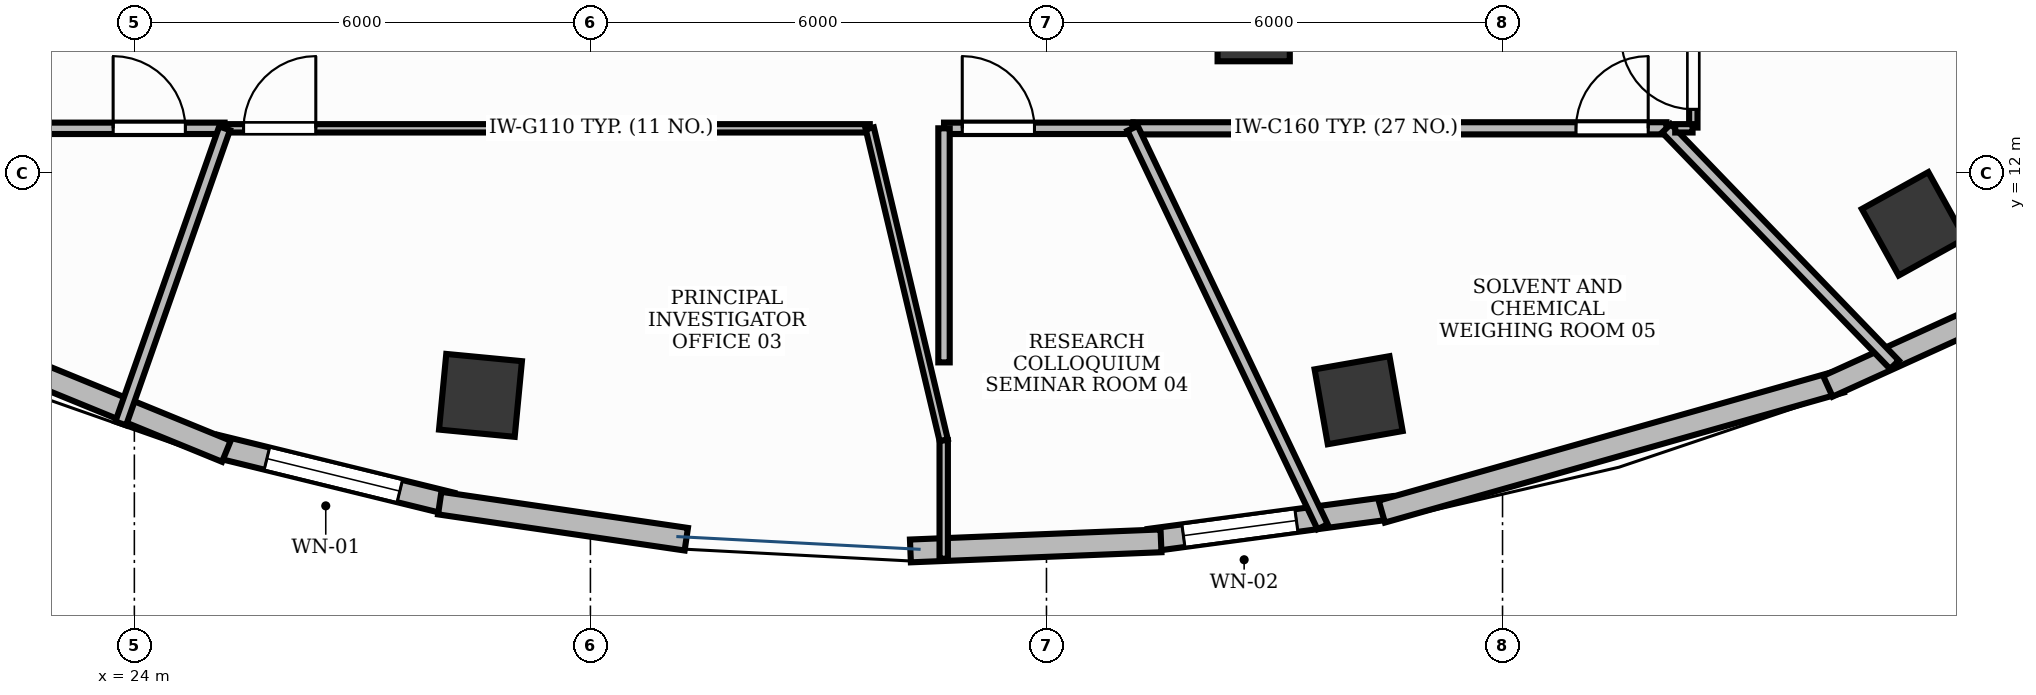
"""IFC4 building model, lengths in metres.
Left out: names, types, materials, properties, quantities, classifications, styles, units other than length and angle.
Written with IfcOpenShell. Run it as: python <this file> out.ifc"""

import sys

from ifc_helpers import new_model, si_unit, direction, frame, frame_2d, origin, origin_2d, place, context, subcontext, project, spatial, rectangle, extrude, element, fill, save


model = new_model("IFC4")
c1 = context("Model", 3, precision=1e-05, world=origin(), true_north=direction((0.0, 1.0)))
c2 = subcontext(c1, "Body", "Model", "MODEL_VIEW")
j1 = project(units=[si_unit("LENGTHUNIT", "METRE"), si_unit("PLANEANGLEUNIT", "RADIAN")], contexts=[c1])
p1 = place(None, origin())
s1 = spatial("IfcSite", under=j1, at=p1, CompositionType="ELEMENT")
p2 = place(p1, origin())
s2 = spatial("IfcBuilding", under=s1, at=p2, CompositionType="ELEMENT")
p3 = place(p2, frame((0.0, 0.0, 204.6)))
s3 = spatial("IfcBuildingStorey", under=s2, at=p3, CompositionType="ELEMENT", Elevation=204.6)
for number, where, z_axis, x_axis in (
    (1, (28.554, 9.076, -0.0), (0.0, 0.0, 1.0), (-0.995, 0.095, 0.0)),
    (2, (40.107, 9.013, -0.0), (0.0, 0.0, 1.0), (0.985, 0.173, 0.0)),
):
    element("IfcColumn", number, at=place(p3, frame(where, z_axis=z_axis, x_axis=x_axis)), inside=s3, PredefinedType="COLUMN", context=c2, shape_type="SweptSolid", body=[
        extrude(rectangle(XDim=1.0, YDim=1.0, at=origin_2d()), origin(), (0.0, 0.0, 1.0), 3.901),
    ])
p4 = place(p3, frame((38.726, 13.947, -0.0), z_axis=(0.0, 0.0, 1.0), x_axis=(1.0, 0.0, 0.0)))
e3 = element("IfcColumn", 3, at=p4, inside=s3, PredefinedType="COLUMN", context=c2, shape_type="SweptSolid", body=[
    extrude(rectangle(XDim=0.95, YDim=0.95, at=origin_2d()), origin(), (0.0, 0.0, 1.0), 3.901),
])
p5 = place(p3, frame((47.407, 11.334, -0.0), z_axis=(0.0, 0.0, 1.0), x_axis=(0.874535078577, 0.484962262797, 0.0)))
e4 = element("IfcColumn", 4, at=p5, inside=s3, PredefinedType="COLUMN", context=c2, shape_type="SweptSolid", body=[
    extrude(rectangle(XDim=1.0, YDim=1.0, at=origin_2d()), origin(), (0.0, 0.0, 1.0), 3.901),
])
p6 = place(p3, frame((25.063, 8.412, 0.0), z_axis=(0.0, 0.0, 1.0), x_axis=(0.971262421812, -0.238011150948, 0.0)))
e5 = element("IfcWall", 5, at=p6, inside=s3, PredefinedType="STANDARD", context=c2, shape_type="SweptSolid", body=[
    extrude(rectangle(XDim=3.201, YDim=0.3, at=frame_2d((1.601, 0.0))), origin(), (0.0, 0.0, 1.0), 3.9),
])
p7 = place(p6, frame((0.701, 0.0, 0.9)))
e6 = element("IfcOpeningElement", 6, at=p7, cuts=e5, PredefinedType="OPENING", context=c2, shape_type="SweptSolid", body=[
    extrude(rectangle(XDim=1.8, YDim=2.1, at=frame_2d((0.9, 1.05))), frame((0.0, 0.165, 0.0), z_axis=(0.0, -1.0, 0.0), x_axis=(1.0, 0.0, 0.0)), (0.0, 0.0, 1.0), 0.33),
])
p8 = place(p3, frame((37.352, 7.17, 0.0), z_axis=(0.0, 0.0, 1.0), x_axis=(0.991126983618, 0.132918404839, 0.0)))
e7 = element("IfcWall", 7, at=p8, inside=s3, PredefinedType="STANDARD", context=c2, shape_type="SweptSolid", body=[
    extrude(rectangle(XDim=3.242, YDim=0.3, at=frame_2d((1.621, 0.0))), origin(), (0.0, 0.0, 1.0), 3.9),
])
p9 = place(p8, frame((0.454, 0.0, 0.95)))
e8 = element("IfcOpeningElement", 8, at=p9, cuts=e7, PredefinedType="OPENING", context=c2, shape_type="SweptSolid", body=[
    extrude(rectangle(XDim=1.5, YDim=1.8, at=frame_2d((0.75, 0.9))), frame((0.0, 0.165, 0.0), z_axis=(0.0, -1.0, 0.0), x_axis=(1.0, 0.0, 0.0)), (0.0, 0.0, 1.0), 0.33),
])
p10 = place(p3, frame((19.526, 10.667, 0.0), z_axis=(0.0, 0.0, 1.0), x_axis=(0.925564684887, -0.37858950605, 0.0)))
e9 = element("IfcWall", 9, at=p10, inside=s3, PredefinedType="STANDARD", context=c2, shape_type="SweptSolid", body=[
    extrude(rectangle(XDim=6.142, YDim=0.3, at=frame_2d((3.071, 0.0))), origin(), (0.0, 0.0, 1.0), 3.47),
])
p11 = place(p3, frame((28.017, 7.659, 0.0), z_axis=(0.0, 0.0, 1.0), x_axis=(0.989444403328, -0.144912983283, 0.0)))
e10 = element("IfcWall", 10, at=p11, inside=s3, PredefinedType="STANDARD", context=c2, shape_type="SweptSolid", body=[
    extrude(rectangle(XDim=3.279, YDim=0.3, at=frame_2d((1.639, 0.0))), origin(), (0.0, 0.0, 1.0), 3.47),
])
p12 = place(p3, frame((34.21, 7.03, 0.0), z_axis=(0.0, 0.0, 1.0), x_axis=(0.999186472466, 0.040328566059, 0.0)))
e11 = element("IfcWall", 11, at=p12, inside=s3, PredefinedType="STANDARD", context=c2, shape_type="SweptSolid", body=[
    extrude(rectangle(XDim=3.299, YDim=0.3, at=frame_2d((1.65, 0.0))), origin(), (0.0, 0.0, 1.0), 3.9),
])
p13 = place(p3, frame((40.412, 7.548, 0.0), z_axis=(0.0, 0.0, 1.0), x_axis=(0.962117712706, 0.272634383189, 0.0)))
e12 = element("IfcWall", 12, at=p13, inside=s3, PredefinedType="STANDARD", context=c2, shape_type="SweptSolid", body=[
    extrude(rectangle(XDim=6.276, YDim=0.3, at=frame_2d((3.138, 0.0))), origin(), (0.0, 0.0, 1.0), 3.9),
])
p14 = place(p3, frame((46.28, 9.197, 0.0), z_axis=(0.0, 0.0, 1.0), x_axis=(0.910521310028, 0.413462143351, 0.0)))
e13 = element("IfcWall", 13, at=p14, inside=s3, PredefinedType="STANDARD", context=c2, shape_type="SweptSolid", body=[
    extrude(rectangle(XDim=3.131, YDim=0.3, at=frame_2d((1.565, 0.0))), origin(), (0.0, 0.0, 1.0), 3.9),
])
p15 = place(p3, frame((20.801, 12.59, 0.0), z_axis=(0.0, 0.0, 1.0), x_axis=(1.0, 0.0, 0.0)))
e14 = element("IfcWall", 14, at=p15, inside=s3, PredefinedType="PARTITIONING", context=c2, shape_type="SweptSolid", body=[
    extrude(rectangle(XDim=4.386, YDim=0.15, at=frame_2d((2.193, 0.0))), origin(), (0.0, 0.0, 1.0), 2.91),
])
p16 = place(p15, frame((2.92, 0.0, 0.0)))
e15 = element("IfcOpeningElement", 15, at=p16, cuts=e14, PredefinedType="OPENING", context=c2, shape_type="SweptSolid", body=[
    extrude(rectangle(XDim=0.95, YDim=2.15, at=frame_2d((0.475, 1.075))), frame((0.0, 0.09, 0.0), z_axis=(0.0, -1.0, 0.0), x_axis=(1.0, 0.0, 0.0)), (0.0, 0.0, 1.0), 0.18),
])
p17 = place(p3, frame((25.197, 12.59, 0.0), z_axis=(0.0, 0.0, 1.0), x_axis=(1.0, 0.0, 0.0)))
e16 = element("IfcWall", 16, at=p17, inside=s3, PredefinedType="MOVABLE", context=c2, shape_type="SweptSolid", body=[
    extrude(rectangle(XDim=8.478, YDim=0.11, at=frame_2d((4.239, 0.0))), origin(), (0.0, 0.0, 1.0), 2.91),
])
p18 = place(p17, frame((0.24, 0.0, 0.0)))
e17 = element("IfcOpeningElement", 17, at=p18, cuts=e16, PredefinedType="OPENING", context=c2, shape_type="SweptSolid", body=[
    extrude(rectangle(XDim=0.95, YDim=2.15, at=frame_2d((0.475, 1.075))), frame((0.0, 0.07, 0.0), z_axis=(0.0, -1.0, 0.0), x_axis=(1.0, 0.0, 0.0)), (0.0, 0.0, 1.0), 0.14),
])
p19 = place(p3, frame((34.652, 12.59, 0.0), z_axis=(0.0, 0.0, 1.0), x_axis=(1.0, 0.0, 0.0)))
e18 = element("IfcWall", 18, at=p19, inside=s3, PredefinedType="PARTITIONING", context=c2, shape_type="SweptSolid", body=[
    extrude(rectangle(XDim=2.48, YDim=0.15, at=frame_2d((1.24, 0.0))), origin(), (0.0, 0.0, 1.0), 2.91),
])
p20 = place(p19, frame((0.24, 0.0, 0.0)))
e19 = element("IfcOpeningElement", 19, at=p20, cuts=e18, PredefinedType="OPENING", context=c2, shape_type="SweptSolid", body=[
    extrude(rectangle(XDim=0.95, YDim=2.15, at=frame_2d((0.475, 1.075))), frame((0.0, 0.09, 0.0), z_axis=(0.0, -1.0, 0.0), x_axis=(1.0, 0.0, 0.0)), (0.0, 0.0, 1.0), 0.18),
])
p21 = place(p3, frame((37.143, 12.59, 0.0), z_axis=(0.0, 0.0, 1.0), x_axis=(1.0, 0.0, 0.0)))
e20 = element("IfcWall", 20, at=p21, inside=s3, PredefinedType="PARTITIONING", context=c2, shape_type="SweptSolid", body=[
    extrude(rectangle(XDim=7.013, YDim=0.16, at=frame_2d((3.507, 0.0))), origin(), (0.0, 0.0, 1.0), 2.91),
])
p22 = place(p21, frame((5.823, 0.0, 0.0)))
e21 = element("IfcOpeningElement", 21, at=p22, cuts=e20, PredefinedType="OPENING", context=c2, shape_type="SweptSolid", body=[
    extrude(rectangle(XDim=0.95, YDim=2.15, at=frame_2d((0.475, 1.075))), frame((0.0, 0.095, 0.0), z_axis=(0.0, -1.0, 0.0), x_axis=(1.0, 0.0, 0.0)), (0.0, 0.0, 1.0), 0.19),
])
p23 = place(p3, frame((44.51, 12.6, 0.0), z_axis=(0.0, 0.0, 1.0), x_axis=(0.0, 1.0, 0.0)))
e22 = element("IfcWall", 22, at=p23, inside=s3, PredefinedType="MOVABLE", context=c2, shape_type="SweptSolid", body=[
    extrude(rectangle(XDim=3.8, YDim=0.11, at=frame_2d((1.9, 0.0))), origin(), (0.0, 0.0, 1.0), 2.91),
])
p24 = place(p23, frame((0.24, 0.0, 0.0)))
e23 = element("IfcOpeningElement", 23, at=p24, cuts=e22, PredefinedType="OPENING", context=c2, shape_type="SweptSolid", body=[
    extrude(rectangle(XDim=0.95, YDim=2.15, at=frame_2d((0.475, 1.075))), frame((0.0, 0.07, 0.0), z_axis=(0.0, -1.0, 0.0), x_axis=(1.0, 0.0, 0.0)), (0.0, 0.0, 1.0), 0.14),
])
p25 = place(p3, frame((25.187, 12.59, 0.0), z_axis=(0.0, 0.0, 1.0), x_axis=(-0.33203815737, -0.9432659551, 0.0)))
e24 = element("IfcWall", 24, at=p25, inside=s3, PredefinedType="PARTITIONING", context=c2, shape_type="SweptSolid", body=[
    extrude(rectangle(XDim=4.116, YDim=0.15, at=frame_2d((2.058, 0.0))), origin(), (0.0, 0.0, 1.0), 2.91),
])
p26 = place(p3, frame((34.648, 8.487, 0.0), z_axis=(0.0, 0.0, 1.0), x_axis=(0.0, -1.0, 0.0)))
e25 = element("IfcWall", 25, at=p26, inside=s3, PredefinedType="MOVABLE", context=c2, shape_type="SweptSolid", body=[
    extrude(rectangle(XDim=1.559, YDim=0.11, at=frame_2d((0.779, 0.0))), origin(), (0.0, 0.0, 1.0), 2.91),
])
p27 = place(p3, frame((33.675, 12.59, 0.0), z_axis=(0.0, 0.0, 1.0), x_axis=(0.230652477901, -0.973036193797, 0.0)))
e26 = element("IfcWall", 26, at=p27, inside=s3, PredefinedType="MOVABLE", context=c2, shape_type="SweptSolid", body=[
    extrude(rectangle(XDim=4.217, YDim=0.11, at=frame_2d((2.108, 0.0))), origin(), (0.0, 0.0, 1.0), 2.91),
])
p28 = place(p3, frame((34.652, 9.51, 0.0), z_axis=(0.0, 0.0, 1.0), x_axis=(0.0, 1.0, 0.0)))
e27 = element("IfcWall", 27, at=p28, inside=s3, PredefinedType="PARTITIONING", context=c2, shape_type="SweptSolid", body=[
    extrude(rectangle(XDim=3.08, YDim=0.15, at=frame_2d((1.54, 0.0))), origin(), (0.0, 0.0, 1.0), 2.91),
])
p29 = place(p3, frame((37.132, 12.59, 0.0), z_axis=(0.0, 0.0, 1.0), x_axis=(0.430506245384, -0.902587598344, 0.0)))
e28 = element("IfcWall", 28, at=p29, inside=s3, PredefinedType="PARTITIONING", context=c2, shape_type="SweptSolid", body=[
    extrude(rectangle(XDim=5.808, YDim=0.15, at=frame_2d((2.904, 0.0))), origin(), (0.0, 0.0, 1.0), 2.91),
])
p30 = place(p3, frame((44.156, 12.59, 0.0), z_axis=(0.0, 0.0, 1.0), x_axis=(0.694194120351, -0.719787832121, 0.0)))
e29 = element("IfcWall", 29, at=p30, inside=s3, PredefinedType="PARTITIONING", context=c2, shape_type="SweptSolid", body=[
    extrude(rectangle(XDim=4.321, YDim=0.16, at=frame_2d((2.161, 0.0))), origin(), (0.0, 0.0, 1.0), 2.91),
])
p31 = place(p3, frame((44.272, 12.59, 0.0), z_axis=(0.0, 0.0, 1.0), x_axis=(1.0, 0.0, 0.0)))
e30 = element("IfcWall", 30, at=p31, inside=s3, PredefinedType="MOVABLE", context=c2, shape_type="SweptSolid", body=[
    extrude(rectangle(XDim=0.228, YDim=0.11, at=frame_2d((0.114, 0.0))), origin(), (0.0, 0.0, 1.0), 2.91),
])
p32 = place(p7, origin())
e31 = element("IfcWindow", 31, at=p32, inside=s3, PartitioningType="SINGLE_PANEL", PredefinedType="WINDOW", context=c2, shape_type="SweptSolid", body=[
    extrude(rectangle(XDim=1.8, YDim=2.1, at=frame_2d((0.9, 1.05))), frame((0.0, 0.03, 0.0), z_axis=(0.0, -1.0, 0.0), x_axis=(1.0, 0.0, 0.0)), (0.0, 0.0, 1.0), 0.06),
])
fill(e6, e31)
p33 = place(p9, origin())
e32 = element("IfcWindow", 32, at=p33, inside=s3, PartitioningType="DOUBLE_PANEL_VERTICAL", PredefinedType="WINDOW", context=c2, shape_type="SweptSolid", body=[
    extrude(rectangle(XDim=1.5, YDim=1.8, at=frame_2d((0.75, 0.9))), frame((0.0, 0.03, 0.0), z_axis=(0.0, -1.0, 0.0), x_axis=(1.0, 0.0, 0.0)), (0.0, 0.0, 1.0), 0.06),
])
fill(e8, e32)
p34 = place(p16, origin())
e33 = element("IfcDoor", 33, at=p34, inside=s3, OperationType="SINGLE_SWING_LEFT", PredefinedType="DOOR", context=c2, shape_type="SweptSolid", body=[
    extrude(rectangle(XDim=0.95, YDim=2.15, at=frame_2d((0.475, 1.075))), frame((0.0, 0.025, 0.0), z_axis=(0.0, -1.0, 0.0), x_axis=(1.0, 0.0, 0.0)), (0.0, 0.0, 1.0), 0.05),
])
fill(e15, e33)
p35 = place(p18, origin())
e34 = element("IfcDoor", 34, at=p35, inside=s3, OperationType="SINGLE_SWING_RIGHT", PredefinedType="DOOR", context=c2, shape_type="SweptSolid", body=[
    extrude(rectangle(XDim=0.95, YDim=2.15, at=frame_2d((0.475, 1.075))), frame((0.0, 0.025, 0.0), z_axis=(0.0, -1.0, 0.0), x_axis=(1.0, 0.0, 0.0)), (0.0, 0.0, 1.0), 0.05),
])
fill(e17, e34)
p36 = place(p20, origin())
e35 = element("IfcDoor", 35, at=p36, inside=s3, OperationType="SINGLE_SWING_LEFT", PredefinedType="DOOR", context=c2, shape_type="SweptSolid", body=[
    extrude(rectangle(XDim=0.95, YDim=2.15, at=frame_2d((0.475, 1.075))), frame((0.0, 0.025, 0.0), z_axis=(0.0, -1.0, 0.0), x_axis=(1.0, 0.0, 0.0)), (0.0, 0.0, 1.0), 0.05),
])
fill(e19, e35)
p37 = place(p22, origin())
e36 = element("IfcDoor", 36, at=p37, inside=s3, OperationType="SINGLE_SWING_RIGHT", PredefinedType="DOOR", context=c2, shape_type="SweptSolid", body=[
    extrude(rectangle(XDim=0.95, YDim=2.15, at=frame_2d((0.475, 1.075))), frame((0.0, 0.025, 0.0), z_axis=(0.0, -1.0, 0.0), x_axis=(1.0, 0.0, 0.0)), (0.0, 0.0, 1.0), 0.05),
])
fill(e21, e36)
p38 = place(p24, origin())
e37 = element("IfcDoor", 37, at=p38, inside=s3, OperationType="SINGLE_SWING_RIGHT", PredefinedType="DOOR", context=c2, shape_type="SweptSolid", body=[
    extrude(rectangle(XDim=0.95, YDim=2.15, at=frame_2d((0.475, 1.075))), frame((0.0, 0.025, 0.0), z_axis=(0.0, -1.0, 0.0), x_axis=(1.0, 0.0, 0.0)), (0.0, 0.0, 1.0), 0.05),
])
fill(e23, e37)
save(model, sys.argv[1])
